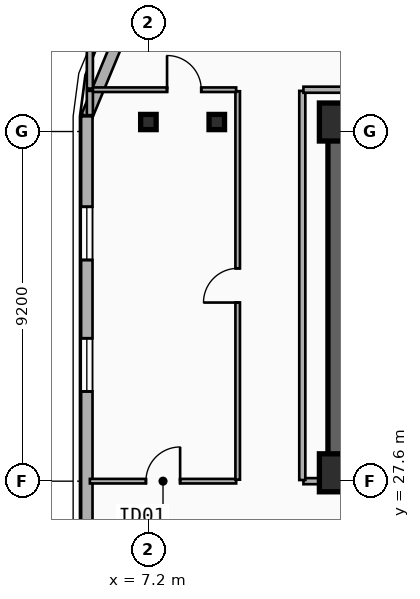
"""IFC4 building model, lengths in metres.
Left out: names, types, materials, properties, quantities, classifications, styles, units other than length and angle.
Written with IfcOpenShell. Run it as: python <this file> out.ifc"""

import sys

from ifc_helpers import new_model, si_unit, direction, frame, frame_2d, origin, origin_2d, place, context, subcontext, project, spatial, rectangle, i_section, extrude, element, fill, save


model = new_model("IFC4")
c1 = context("Model", 3, precision=1e-05, world=origin(), true_north=direction((0.0, 1.0)))
c2 = subcontext(c1, "Body", "Model", "MODEL_VIEW")
j1 = project(units=[si_unit("LENGTHUNIT", "METRE"), si_unit("PLANEANGLEUNIT", "RADIAN")], contexts=[c1])
p1 = place(None, origin())
s1 = spatial("IfcSite", under=j1, at=p1, CompositionType="ELEMENT")
p2 = place(p1, origin())
s2 = spatial("IfcBuilding", under=s1, at=p2, CompositionType="ELEMENT")
p3 = place(p2, frame((0.0, 0.0, 204.0)))
s3 = spatial("IfcBuildingStorey", under=s2, at=p3, CompositionType="ELEMENT", Elevation=204.0)
p4 = place(p3, frame((12.15, 37.05, 0.0), z_axis=(0.0, 0.0, 1.0), x_axis=(1.0, 0.0, 0.0)))
e1 = element("IfcWall", 1, at=p4, inside=s3, PredefinedType="SHEAR", context=c2, shape_type="SweptSolid", body=[
    extrude(rectangle(XDim=33.23, YDim=0.45, at=frame_2d((16.615, 0.0))), origin(), (0.0, 0.0, 1.0), 3.6),
])
p5 = place(p3, frame((21.18, 27.82, 0.0), z_axis=(0.0, 0.0, 1.0), x_axis=(-1.0, 0.0, 0.0)))
e2 = element("IfcWall", 2, at=p5, inside=s3, PredefinedType="SHEAR", context=c2, shape_type="SweptSolid", body=[
    extrude(rectangle(XDim=9.03, YDim=0.45, at=frame_2d((4.515, 0.0))), origin(), (0.0, 0.0, 1.0), 3.6),
])
p6 = place(p5, frame((2.68, 0.0, 0.0)))
e3 = element("IfcOpeningElement", 3, at=p6, cuts=e2, PredefinedType="OPENING", context=c2, shape_type="SweptSolid", body=[
    extrude(rectangle(XDim=1.1, YDim=2.15, at=frame_2d((0.55, 1.075))), frame((0.0, 0.235, 0.0), z_axis=(0.0, -1.0, 0.0), x_axis=(1.0, 0.0, 0.0)), (0.0, 0.0, 1.0), 0.47),
])
p7 = place(p3, frame((12.15, 28.045, 0.0), z_axis=(0.0, 0.0, 1.0), x_axis=(0.0, 1.0, 0.0)))
e4 = element("IfcWall", 4, at=p7, inside=s3, PredefinedType="SHEAR", context=c2, shape_type="SweptSolid", body=[
    extrude(rectangle(XDim=8.78, YDim=0.45, at=frame_2d((4.39, 0.0))), origin(), (0.0, 0.0, 1.0), 3.6),
])
for number, where, z_axis, x_axis in (
    (5, (12.2, 27.82, 0.0), (0.0, 0.0, 1.0), (1.0, 0.0, 0.0)),
    (6, (12.2, 37.05, 0.0), (0.0, 0.0, 1.0), (1.0, 0.0, 0.0)),
):
    element("IfcColumn", number, at=place(p3, frame(where, z_axis=z_axis, x_axis=x_axis)), inside=s3, PredefinedType="COLUMN", context=c2, shape_type="SweptSolid", body=[
        extrude(rectangle(XDim=1.0, YDim=1.0, at=origin_2d()), origin(), (0.0, 0.0, 1.0), 3.6),
    ])
for number, where, z_axis, x_axis in (
    (7, (9.0, 37.05, 0.0), (0.0, 0.0, 1.0), (1.0, 0.0, 0.0)),
    (8, (7.2, 37.05, 0.0), (0.0, 0.0, 1.0), (1.0, 0.0, 0.0)),
):
    element("IfcColumn", number, at=place(p3, frame(where, z_axis=z_axis, x_axis=x_axis)), inside=s3, PredefinedType="COLUMN", context=c2, shape_type="SweptSolid", body=[
        extrude(i_section(OverallWidth=0.408, OverallDepth=0.4, WebThickness=0.025, FlangeThickness=0.039, FilletRadius=0.015, at=origin_2d()), origin(), (0.0, 0.0, 1.0), 3.6),
    ])
p8 = place(p3, frame((5.58, 37.2, 0.0), z_axis=(0.0, 0.0, 1.0), x_axis=(0.382636798336, 0.92389884758, 0.0)))
e9 = element("IfcWall", 9, at=p8, inside=s3, PredefinedType="SOLIDWALL", context=c2, shape_type="SweptSolid", body=[
    extrude(rectangle(XDim=3.077, YDim=0.3, at=frame_2d((1.538, 0.0))), origin(), (0.0, 0.0, 1.0), 3.34),
])
p9 = place(p3, frame((5.58, 8.6, 0.0), z_axis=(0.0, 0.0, 1.0), x_axis=(0.0, 1.0, 0.0)))
e10 = element("IfcWall", 10, at=p9, inside=s3, PredefinedType="SOLIDWALL", context=c2, shape_type="SweptSolid", body=[
    extrude(rectangle(XDim=28.6, YDim=0.3, at=frame_2d((14.3, 0.0))), origin(), (0.0, 0.0, 1.0), 3.34),
])
p10 = place(p9, frame((21.36, 0.0, 0.34)))
e11 = element("IfcOpeningElement", 11, at=p10, cuts=e10, PredefinedType="OPENING", context=c2, shape_type="SweptSolid", body=[
    extrude(rectangle(XDim=1.4, YDim=2.1, at=frame_2d((0.7, 1.05))), frame((0.0, 0.16, 0.0), z_axis=(0.0, -1.0, 0.0), x_axis=(1.0, 0.0, 0.0)), (0.0, 0.0, 1.0), 0.32),
])
p11 = place(p9, frame((24.82, 0.0, 0.34)))
e12 = element("IfcOpeningElement", 12, at=p11, cuts=e10, PredefinedType="OPENING", context=c2, shape_type="SweptSolid", body=[
    extrude(rectangle(XDim=1.4, YDim=2.1, at=frame_2d((0.7, 1.05))), frame((0.0, 0.16, 0.0), z_axis=(0.0, -1.0, 0.0), x_axis=(1.0, 0.0, 0.0)), (0.0, 0.0, 1.0), 0.32),
])
p12 = place(p9, frame((4.797, 0.0, 0.34)))
e13 = element("IfcOpeningElement", 13, at=p12, cuts=e10, PredefinedType="OPENING", context=c2, shape_type="SweptSolid", body=[
    extrude(rectangle(XDim=1.4, YDim=2.1, at=frame_2d((0.7, 1.05))), frame((0.0, 0.16, 0.0), z_axis=(0.0, -1.0, 0.0), x_axis=(1.0, 0.0, 0.0)), (0.0, 0.0, 1.0), 0.32),
])
p13 = place(p9, frame((10.673, 0.0, 0.34)))
e14 = element("IfcOpeningElement", 14, at=p13, cuts=e10, PredefinedType="OPENING", context=c2, shape_type="SweptSolid", body=[
    extrude(rectangle(XDim=1.4, YDim=2.1, at=frame_2d((0.7, 1.05))), frame((0.0, 0.16, 0.0), z_axis=(0.0, -1.0, 0.0), x_axis=(1.0, 0.0, 0.0)), (0.0, 0.0, 1.0), 0.32),
])
p14 = place(p3, frame((5.66, 27.6, 0.0), z_axis=(0.0, 0.0, 1.0), x_axis=(1.0, 0.0, 0.0)))
e15 = element("IfcWall", 15, at=p14, inside=s3, PredefinedType="PARTITIONING", context=c2, shape_type="SweptSolid", body=[
    extrude(rectangle(XDim=3.85, YDim=0.12, at=frame_2d((1.925, 0.0))), origin(), (0.0, 0.0, 1.0), 2.67),
])
p15 = place(p14, frame((1.475, 0.0, 0.0)))
e16 = element("IfcOpeningElement", 16, at=p15, cuts=e15, PredefinedType="OPENING", context=c2, shape_type="SweptSolid", body=[
    extrude(rectangle(XDim=0.9, YDim=2.1, at=frame_2d((0.45, 1.05))), frame((0.0, 0.07, 0.0), z_axis=(0.0, -1.0, 0.0), x_axis=(1.0, 0.0, 0.0)), (0.0, 0.0, 1.0), 0.14),
])
p16 = place(p3, frame((9.55, 27.64, 0.0), z_axis=(0.0, 0.0, 1.0), x_axis=(0.0, 1.0, 0.0)))
e17 = element("IfcWall", 17, at=p16, inside=s3, PredefinedType="PARTITIONING", context=c2, shape_type="SweptSolid", body=[
    extrude(rectangle(XDim=10.22, YDim=0.12, at=frame_2d((5.11, 0.0))), origin(), (0.0, 0.0, 1.0), 2.82),
])
p17 = place(p16, frame((4.66, 0.0, 0.0)))
e18 = element("IfcOpeningElement", 18, at=p17, cuts=e17, PredefinedType="OPENING", context=c2, shape_type="SweptSolid", body=[
    extrude(rectangle(XDim=0.9, YDim=2.1, at=frame_2d((0.45, 1.05))), frame((0.0, 0.07, 0.0), z_axis=(0.0, -1.0, 0.0), x_axis=(1.0, 0.0, 0.0)), (0.0, 0.0, 1.0), 0.14),
])
p18 = place(p3, frame((5.66, 37.9, 0.0), z_axis=(0.0, 0.0, 1.0), x_axis=(1.0, 0.0, 0.0)))
e19 = element("IfcWall", 19, at=p18, inside=s3, PredefinedType="PARTITIONING", context=c2, shape_type="SweptSolid", body=[
    extrude(rectangle(XDim=3.85, YDim=0.12, at=frame_2d((1.925, 0.0))), origin(), (0.0, 0.0, 1.0), 3.34),
])
p19 = place(p18, frame((2.031, 0.0, 0.0)))
e20 = element("IfcOpeningElement", 20, at=p19, cuts=e19, PredefinedType="OPENING", context=c2, shape_type="SweptSolid", body=[
    extrude(rectangle(XDim=0.9, YDim=2.1, at=frame_2d((0.45, 1.05))), frame((0.0, 0.07, 0.0), z_axis=(0.0, -1.0, 0.0), x_axis=(1.0, 0.0, 0.0)), (0.0, 0.0, 1.0), 0.14),
])
p20 = place(p3, frame((11.28, 27.6, 0.0), z_axis=(0.0, 0.0, 1.0), x_axis=(1.0, 0.0, 0.0)))
e21 = element("IfcWall", 21, at=p20, inside=s3, PredefinedType="PARTITIONING", context=c2, shape_type="SweptSolid", body=[
    extrude(rectangle(XDim=0.84, YDim=0.16, at=frame_2d((0.42, 0.0))), origin(), (0.0, 0.0, 1.0), 2.41),
])
p21 = place(p3, frame((11.25, 27.63, 0.0), z_axis=(0.0, 0.0, 1.0), x_axis=(0.0, 1.0, 0.0)))
e22 = element("IfcWall", 22, at=p21, inside=s3, PredefinedType="PARTITIONING", context=c2, shape_type="SweptSolid", body=[
    extrude(rectangle(XDim=10.24, YDim=0.16, at=frame_2d((5.12, 0.0))), origin(), (0.0, 0.0, 1.0), 2.82),
])
p22 = place(p3, frame((11.28, 37.9, 0.0), z_axis=(0.0, 0.0, 1.0), x_axis=(1.0, 0.0, 0.0)))
e23 = element("IfcWall", 23, at=p22, inside=s3, PredefinedType="PARTITIONING", context=c2, shape_type="SweptSolid", body=[
    extrude(rectangle(XDim=35.04, YDim=0.16, at=frame_2d((17.52, 0.0))), origin(), (0.0, 0.0, 1.0), 3.34),
])
p23 = place(p3, frame((5.66, 37.93, 0.0), z_axis=(0.0, 0.0, 1.0), x_axis=(0.0, 1.0, 0.0)))
e24 = element("IfcWall", 24, at=p23, inside=s3, PredefinedType="PARTITIONING", context=c2, shape_type="SweptSolid", body=[
    extrude(rectangle(XDim=1.44, YDim=0.16, at=frame_2d((0.72, 0.0))), origin(), (0.0, 0.0, 1.0), 3.34),
])
p24 = place(p3, frame((5.66, 37.23, 0.0), z_axis=(0.0, 0.0, 1.0), x_axis=(0.0, 1.0, 0.0)))
e25 = element("IfcWall", 25, at=p24, inside=s3, PredefinedType="PARTITIONING", context=c2, shape_type="SweptSolid", body=[
    extrude(rectangle(XDim=0.64, YDim=0.16, at=frame_2d((0.32, 0.0))), origin(), (0.0, 0.0, 1.0), 3.34),
])
p25 = place(p10, origin())
e26 = element("IfcWindow", 26, at=p25, inside=s3, PartitioningType="SINGLE_PANEL", PredefinedType="WINDOW", context=c2, shape_type="SweptSolid", body=[
    extrude(rectangle(XDim=1.4, YDim=2.1, at=frame_2d((0.7, 1.05))), frame((0.0, 0.03, 0.0), z_axis=(0.0, -1.0, 0.0), x_axis=(1.0, 0.0, 0.0)), (0.0, 0.0, 1.0), 0.06),
])
fill(e11, e26)
p26 = place(p11, origin())
e27 = element("IfcWindow", 27, at=p26, inside=s3, PartitioningType="SINGLE_PANEL", PredefinedType="WINDOW", context=c2, shape_type="SweptSolid", body=[
    extrude(rectangle(XDim=1.4, YDim=2.1, at=frame_2d((0.7, 1.05))), frame((0.0, 0.03, 0.0), z_axis=(0.0, -1.0, 0.0), x_axis=(1.0, 0.0, 0.0)), (0.0, 0.0, 1.0), 0.06),
])
fill(e12, e27)
p27 = place(p15, origin())
e28 = element("IfcDoor", 28, at=p27, inside=s3, OperationType="SINGLE_SWING_RIGHT", PredefinedType="DOOR", context=c2, shape_type="SweptSolid", body=[
    extrude(rectangle(XDim=0.9, YDim=2.1, at=frame_2d((0.45, 1.05))), frame((0.0, 0.025, 0.0), z_axis=(0.0, -1.0, 0.0), x_axis=(1.0, 0.0, 0.0)), (0.0, 0.0, 1.0), 0.05),
])
fill(e16, e28)
p28 = place(p17, origin())
e29 = element("IfcDoor", 29, at=p28, inside=s3, OperationType="SINGLE_SWING_LEFT", PredefinedType="DOOR", context=c2, shape_type="SweptSolid", body=[
    extrude(rectangle(XDim=0.9, YDim=2.1, at=frame_2d((0.45, 1.05))), frame((0.0, 0.025, 0.0), z_axis=(0.0, -1.0, 0.0), x_axis=(1.0, 0.0, 0.0)), (0.0, 0.0, 1.0), 0.05),
])
fill(e18, e29)
p29 = place(p19, origin())
e30 = element("IfcDoor", 30, at=p29, inside=s3, OperationType="SINGLE_SWING_LEFT", PredefinedType="DOOR", context=c2, shape_type="SweptSolid", body=[
    extrude(rectangle(XDim=0.9, YDim=2.1, at=frame_2d((0.45, 1.05))), frame((0.0, 0.025, 0.0), z_axis=(0.0, -1.0, 0.0), x_axis=(1.0, 0.0, 0.0)), (0.0, 0.0, 1.0), 0.05),
])
fill(e20, e30)
save(model, sys.argv[1])
